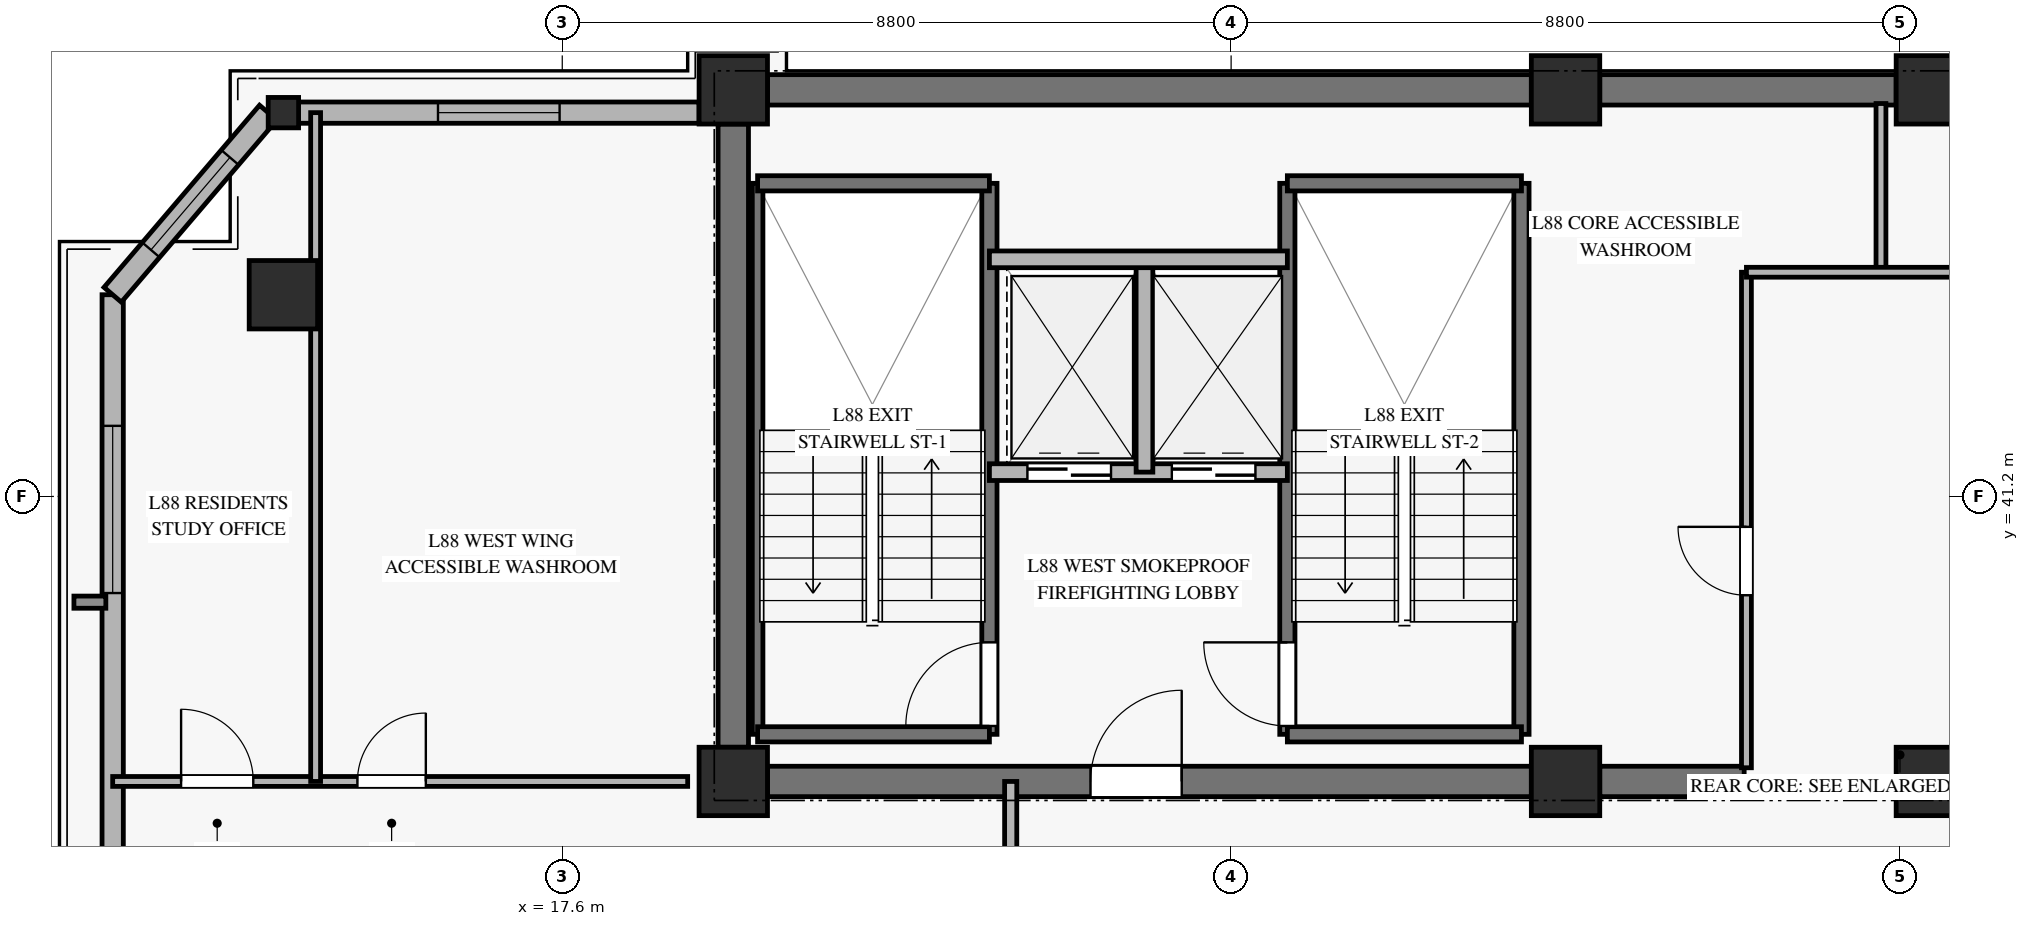
"""IFC4 building model, lengths in metres.
Left out: names, types, materials, properties, quantities, classifications, styles, units other than length and angle.
Written with IfcOpenShell. Run it as: python <this file> out.ifc"""

import sys

from ifc_helpers import new_model, si_unit, direction, frame, frame_2d, origin, origin_2d, place, context, subcontext, project, spatial, rectangle, hollow_rectangle, extrude, source, transform, mapped, element, fill, save


model = new_model("IFC4")
c1 = context("Model", 3, precision=1e-05, world=origin(), true_north=direction((0.0, 1.0)))
c2 = subcontext(c1, "Body", "Model", "MODEL_VIEW")
j1 = project(units=[si_unit("LENGTHUNIT", "METRE"), si_unit("PLANEANGLEUNIT", "RADIAN")], contexts=[c1])
p1 = place(None, origin())
s1 = spatial("IfcSite", under=j1, at=p1, CompositionType="ELEMENT")
p2 = place(p1, origin())
s2 = spatial("IfcBuilding", under=s1, at=p2, CompositionType="ELEMENT")
p3 = place(p2, frame((0.0, 0.0, 339.1)))
s3 = spatial("IfcBuildingStorey", under=s2, at=p3, CompositionType="ELEMENT", Elevation=339.1)
m1 = source(origin(), c2, "Body", "SweptSolid", [
    extrude(rectangle(XDim=0.9, YDim=0.9, at=origin_2d()), origin(), (0.0, 0.0, 1.0), 3.185),
])
for number, where, z_axis, x_axis in (
    (1, (19.85, 37.45, 0.0), (0.0, 0.0, 1.0), (1.0, 0.0, 0.0)),
    (2, (19.85, 46.55, 0.0), (0.0, 0.0, 1.0), (1.0, 0.0, 0.0)),
    (3, (30.8, 37.45, 0.0), (0.0, 0.0, 1.0), (1.0, 0.0, 0.0)),
    (4, (30.8, 46.55, 0.0), (0.0, 0.0, 1.0), (1.0, 0.0, 0.0)),
    (5, (35.6, 37.45, 0.0), (0.0, 0.0, 1.0), (1.0, 0.0, 0.0)),
    (6, (35.6, 46.55, 0.0), (0.0, 0.0, 1.0), (1.0, 0.0, 0.0)),
):
    element("IfcColumn", number, at=place(p3, frame(where, z_axis=z_axis, x_axis=x_axis)), inside=s3, PredefinedType="PILASTER", context=c2, shape_type="MappedRepresentation", body=[
        mapped(m1, transform((0.0, 0.0, 0.0), x_axis=(1.0, 0.0, 0.0), y_axis=(0.0, 1.0, 0.0), z_axis=(0.0, 0.0, 1.0), scale=1.0)),
    ])
p4 = place(p3, frame((20.3, 46.55, 0.0), z_axis=(0.0, 0.0, 1.0), x_axis=(1.0, 0.0, 0.0)))
e7 = element("IfcWall", 7, at=p4, inside=s3, PredefinedType="SHEAR", context=c2, shape_type="SweptSolid", body=[
    extrude(rectangle(XDim=10.05, YDim=0.4, at=frame_2d((5.025, 0.0))), origin(), (0.0, 0.0, 1.0), 3.185),
])
p5 = place(p3, frame((31.25, 46.55, 0.0), z_axis=(0.0, 0.0, 1.0), x_axis=(1.0, 0.0, 0.0)))
e8 = element("IfcWall", 8, at=p5, inside=s3, PredefinedType="SHEAR", context=c2, shape_type="SweptSolid", body=[
    extrude(rectangle(XDim=3.9, YDim=0.4, at=frame_2d((1.95, 0.0))), origin(), (0.0, 0.0, 1.0), 3.185),
])
p6 = place(p3, frame((20.3, 37.45, 0.0), z_axis=(0.0, 0.0, 1.0), x_axis=(1.0, 0.0, 0.0)))
e9 = element("IfcWall", 9, at=p6, inside=s3, PredefinedType="SHEAR", context=c2, shape_type="SweptSolid", body=[
    extrude(rectangle(XDim=10.05, YDim=0.4, at=frame_2d((5.025, 0.0))), origin(), (0.0, 0.0, 1.0), 3.185),
])
p7 = place(p6, frame((4.25, 0.0, 0.0)))
e10 = element("IfcOpeningElement", 10, at=p7, cuts=e9, PredefinedType="OPENING", context=c2, shape_type="SweptSolid", body=[
    extrude(rectangle(XDim=1.2, YDim=2.15, at=frame_2d((0.6, 1.075))), frame((0.0, 0.21, 0.0), z_axis=(0.0, -1.0, 0.0), x_axis=(1.0, 0.0, 0.0)), (0.0, 0.0, 1.0), 0.42),
])
p8 = place(p3, frame((31.25, 37.45, 0.0), z_axis=(0.0, 0.0, 1.0), x_axis=(1.0, 0.0, 0.0)))
e11 = element("IfcWall", 11, at=p8, inside=s3, PredefinedType="SHEAR", context=c2, shape_type="SweptSolid", body=[
    extrude(rectangle(XDim=1.9, YDim=0.4, at=frame_2d((0.95, 0.0))), origin(), (0.0, 0.0, 1.0), 3.185),
])
p9 = place(p3, frame((19.85, 37.9, 0.0), z_axis=(0.0, 0.0, 1.0), x_axis=(0.0, 1.0, 0.0)))
e12 = element("IfcWall", 12, at=p9, inside=s3, PredefinedType="SHEAR", context=c2, shape_type="SweptSolid", body=[
    extrude(rectangle(XDim=8.2, YDim=0.4, at=frame_2d((4.1, 0.0))), origin(), (0.0, 0.0, 1.0), 3.185),
])
m2 = source(origin(), c2, "Body", "SweptSolid", [
    extrude(hollow_rectangle(XDim=0.9, YDim=0.9, WallThickness=0.04, at=origin_2d()), origin(), (0.0, 0.0, 1.0), 3.185),
])
p10 = place(p3, frame((13.931, 43.854, 0.0), z_axis=(0.0, 0.0, 1.0), x_axis=(1.0, 0.0, 0.0)))
e13 = element("IfcColumn", 13, at=p10, inside=s3, PredefinedType="COLUMN", context=c2, shape_type="MappedRepresentation", body=[
    mapped(m2, transform((0.0, 0.0, 0.0), x_axis=(1.0, 0.0, 0.0), y_axis=(0.0, 1.0, 0.0), z_axis=(0.0, 0.0, 1.0), scale=1.0)),
])
m3 = source(origin(), c2, "Body", "SweptSolid", [
    extrude(hollow_rectangle(XDim=0.4, YDim=0.4, WallThickness=0.02, at=origin_2d()), origin(), (0.0, 0.0, 1.0), 3.185),
])
p11 = place(p3, frame((13.931, 46.25, 0.0), z_axis=(0.0, 0.0, 1.0), x_axis=(1.0, 0.0, 0.0)))
e14 = element("IfcColumn", 14, at=p11, inside=s3, PredefinedType="COLUMN", context=c2, shape_type="MappedRepresentation", body=[
    mapped(m3, transform((0.0, 0.0, 0.0), x_axis=(1.0, 0.0, 0.0), y_axis=(0.0, 1.0, 0.0), z_axis=(0.0, 0.0, 1.0), scale=1.0)),
])
p12 = place(p3, frame((11.685, 34.534, 0.0), z_axis=(0.0, 0.0, 1.0), x_axis=(0.0, 1.0, 0.0)))
e15 = element("IfcWall", 15, at=p12, inside=s3, PredefinedType="SOLIDWALL", context=c2, shape_type="SweptSolid", body=[
    extrude(rectangle(XDim=9.32, YDim=0.28, at=frame_2d((4.66, 0.0))), origin(), (0.0, 0.0, 1.0), 2.815),
])
p13 = place(p12, frame((5.395, 0.0, 0.45)))
e16 = element("IfcOpeningElement", 16, at=p13, cuts=e15, PredefinedType="OPENING", context=c2, shape_type="SweptSolid", body=[
    extrude(rectangle(XDim=2.2, YDim=2.1, at=frame_2d((1.1, 1.05))), frame((0.0, 0.15, 0.0), z_axis=(0.0, -1.0, 0.0), x_axis=(1.0, 0.0, 0.0)), (0.0, 0.0, 1.0), 0.3),
])
p14 = place(p3, frame((14.131, 46.25, 0.0), z_axis=(0.0, 0.0, 1.0), x_axis=(1.0, 0.0, 0.0)))
e17 = element("IfcWall", 17, at=p14, inside=s3, PredefinedType="SOLIDWALL", context=c2, shape_type="SweptSolid", body=[
    extrude(rectangle(XDim=5.269, YDim=0.28, at=frame_2d((2.634, 0.0))), origin(), (0.0, 0.0, 1.0), 2.815),
])
p15 = place(p14, frame((1.834, 0.0, 0.45)))
e18 = element("IfcOpeningElement", 18, at=p15, cuts=e17, PredefinedType="OPENING", context=c2, shape_type="SweptSolid", body=[
    extrude(rectangle(XDim=1.6, YDim=2.0, at=frame_2d((0.8, 1.0))), frame((0.0, 0.15, 0.0), z_axis=(0.0, -1.0, 0.0), x_axis=(1.0, 0.0, 0.0)), (0.0, 0.0, 1.0), 0.3),
])
p16 = place(p3, frame((13.731, 46.25, 0.0), z_axis=(0.0, 0.0, 1.0), x_axis=(-0.64936076944, -0.760480500153, 0.0)))
e19 = element("IfcWall", 19, at=p16, inside=s3, PredefinedType="SOLIDWALL", context=c2, shape_type="SweptSolid", body=[
    extrude(rectangle(XDim=3.151, YDim=0.3, at=frame_2d((1.575, 0.0))), origin(), (0.0, 0.0, 1.0), 2.815),
])
p17 = place(p16, frame((0.775, 0.0, 0.45)))
e20 = element("IfcOpeningElement", 20, at=p17, cuts=e19, PredefinedType="OPENING", context=c2, shape_type="SweptSolid", body=[
    extrude(rectangle(XDim=1.6, YDim=2.0, at=frame_2d((0.8, 1.0))), frame((0.0, 0.16, 0.0), z_axis=(0.0, -1.0, 0.0), x_axis=(1.0, 0.0, 0.0)), (0.0, 0.0, 1.0), 0.32),
])
p18 = place(p3, frame((20.17, 38.07, 0.0), z_axis=(0.0, 0.0, 1.0), x_axis=(0.0, 1.0, 0.0)))
e21 = element("IfcWall", 21, at=p18, inside=s3, PredefinedType="SOLIDWALL", context=c2, shape_type="SweptSolid", body=[
    extrude(rectangle(XDim=7.25, YDim=0.14, at=frame_2d((3.625, 0.0))), origin(), (0.0, 0.0, 1.0), 3.4),
])
p19 = place(p3, frame((23.22, 38.07, 0.0), z_axis=(0.0, 0.0, 1.0), x_axis=(0.0, 1.0, 0.0)))
e22 = element("IfcWall", 22, at=p19, inside=s3, PredefinedType="SOLIDWALL", context=c2, shape_type="SweptSolid", body=[
    extrude(rectangle(XDim=7.25, YDim=0.2, at=frame_2d((3.625, 0.0))), origin(), (0.0, 0.0, 1.0), 3.4),
])
p20 = place(p19, frame((0.11, 0.0, 0.0)))
e23 = element("IfcOpeningElement", 23, at=p20, cuts=e22, PredefinedType="OPENING", context=c2, shape_type="SweptSolid", body=[
    extrude(rectangle(XDim=1.1, YDim=2.15, at=frame_2d((0.55, 1.075))), frame((0.0, 0.11, 0.0), z_axis=(0.0, -1.0, 0.0), x_axis=(1.0, 0.0, 0.0)), (0.0, 0.0, 1.0), 0.22),
])
for number, where, z_axis, x_axis in (
    (24, (20.17, 45.32, 0.0), (0.0, 0.0, 1.0), (1.0, 0.0, 0.0)),
    (25, (20.17, 38.07, 0.0), (0.0, 0.0, 1.0), (1.0, 0.0, 0.0)),
):
    element("IfcWall", number, at=place(p3, frame(where, z_axis=z_axis, x_axis=x_axis)), inside=s3, PredefinedType="SOLIDWALL", context=c2, shape_type="SweptSolid", body=[
        extrude(rectangle(XDim=3.05, YDim=0.2, at=frame_2d((1.525, 0.0))), origin(), (0.0, 0.0, 1.0), 3.4),
    ])
p21 = place(p3, frame((27.14, 38.07, 0.0), z_axis=(0.0, 0.0, 1.0), x_axis=(0.0, 1.0, 0.0)))
e26 = element("IfcWall", 26, at=p21, inside=s3, PredefinedType="SOLIDWALL", context=c2, shape_type="SweptSolid", body=[
    extrude(rectangle(XDim=7.25, YDim=0.2, at=frame_2d((3.625, 0.0))), origin(), (0.0, 0.0, 1.0), 3.4),
])
p22 = place(p21, frame((0.11, 0.0, 0.0)))
e27 = element("IfcOpeningElement", 27, at=p22, cuts=e26, PredefinedType="OPENING", context=c2, shape_type="SweptSolid", body=[
    extrude(rectangle(XDim=1.1, YDim=2.15, at=frame_2d((0.55, 1.075))), frame((0.0, 0.11, 0.0), z_axis=(0.0, -1.0, 0.0), x_axis=(1.0, 0.0, 0.0)), (0.0, 0.0, 1.0), 0.22),
])
p23 = place(p3, frame((30.22, 38.07, 0.0), z_axis=(0.0, 0.0, 1.0), x_axis=(0.0, 1.0, 0.0)))
e28 = element("IfcWall", 28, at=p23, inside=s3, PredefinedType="SOLIDWALL", context=c2, shape_type="SweptSolid", body=[
    extrude(rectangle(XDim=7.25, YDim=0.2, at=frame_2d((3.625, 0.0))), origin(), (0.0, 0.0, 1.0), 3.4),
])
for number, where, z_axis, x_axis in (
    (29, (27.14, 45.32, 0.0), (0.0, 0.0, 1.0), (1.0, 0.0, 0.0)),
    (30, (27.14, 38.07, 0.0), (0.0, 0.0, 1.0), (1.0, 0.0, 0.0)),
):
    element("IfcWall", number, at=place(p3, frame(where, z_axis=z_axis, x_axis=x_axis)), inside=s3, PredefinedType="SOLIDWALL", context=c2, shape_type="SweptSolid", body=[
        extrude(rectangle(XDim=3.08, YDim=0.2, at=frame_2d((1.54, 0.0))), origin(), (0.0, 0.0, 1.0), 3.4),
    ])
p24 = place(p3, frame((23.22, 41.52, 0.0), z_axis=(0.0, 0.0, 1.0), x_axis=(1.0, 0.0, 0.0)))
e31 = element("IfcWall", 31, at=p24, inside=s3, PredefinedType="SOLIDWALL", context=c2, shape_type="SweptSolid", body=[
    extrude(rectangle(XDim=3.92, YDim=0.22, at=frame_2d((1.96, 0.0))), origin(), (0.0, 0.0, 1.0), 3.185),
])
p25 = place(p24, frame((0.5, 0.0, 0.0)))
e32 = element("IfcOpeningElement", 32, at=p25, cuts=e31, PredefinedType="OPENING", context=c2, shape_type="SweptSolid", body=[
    extrude(rectangle(XDim=1.1, YDim=2.2, at=frame_2d((0.55, 1.1))), frame((0.0, 0.12, 0.0), z_axis=(0.0, -1.0, 0.0), x_axis=(1.0, 0.0, 0.0)), (0.0, 0.0, 1.0), 0.24),
])
p26 = place(p24, frame((2.4, 0.0, 0.0)))
e33 = element("IfcOpeningElement", 33, at=p26, cuts=e31, PredefinedType="OPENING", context=c2, shape_type="SweptSolid", body=[
    extrude(rectangle(XDim=1.1, YDim=2.2, at=frame_2d((0.55, 1.1))), frame((0.0, 0.12, 0.0), z_axis=(0.0, -1.0, 0.0), x_axis=(1.0, 0.0, 0.0)), (0.0, 0.0, 1.0), 0.24),
])
p27 = place(p3, frame((25.26, 41.52, 0.0), z_axis=(0.0, 0.0, 1.0), x_axis=(0.0, 1.0, 0.0)))
e34 = element("IfcWall", 34, at=p27, inside=s3, PredefinedType="SOLIDWALL", context=c2, shape_type="SweptSolid", body=[
    extrude(rectangle(XDim=2.8, YDim=0.22, at=frame_2d((1.4, 0.0))), origin(), (0.0, 0.0, 1.0), 3.185),
])
p28 = place(p3, frame((23.22, 44.32, 0.0), z_axis=(0.0, 0.0, 1.0), x_axis=(1.0, 0.0, 0.0)))
e35 = element("IfcWall", 35, at=p28, inside=s3, PredefinedType="SOLIDWALL", context=c2, shape_type="SweptSolid", body=[
    extrude(rectangle(XDim=3.92, YDim=0.22, at=frame_2d((1.96, 0.0))), origin(), (0.0, 0.0, 1.0), 3.185),
])
p29 = place(p3, frame((33.18, 37.63, 0.0), z_axis=(0.0, 0.0, 1.0), x_axis=(0.0, 1.0, 0.0)))
e36 = element("IfcWall", 36, at=p29, inside=s3, PredefinedType="PARTITIONING", context=c2, shape_type="SweptSolid", body=[
    extrude(rectangle(XDim=6.52, YDim=0.13, at=frame_2d((3.26, 0.0))), origin(), (0.0, 0.0, 1.0), 2.27),
])
p30 = place(p29, frame((2.27, 0.0, 0.0)))
e37 = element("IfcOpeningElement", 37, at=p30, cuts=e36, PredefinedType="OPENING", context=c2, shape_type="SweptSolid", body=[
    extrude(rectangle(XDim=0.9, YDim=2.1, at=frame_2d((0.45, 1.05))), frame((0.0, 0.075, 0.0), z_axis=(0.0, -1.0, 0.0), x_axis=(1.0, 0.0, 0.0)), (0.0, 0.0, 1.0), 0.15),
])
p31 = place(p3, frame((34.95, 44.15, 0.0), z_axis=(0.0, 0.0, 1.0), x_axis=(0.0, 1.0, 0.0)))
e38 = element("IfcWall", 38, at=p31, inside=s3, PredefinedType="PARTITIONING", context=c2, shape_type="SweptSolid", body=[
    extrude(rectangle(XDim=2.22, YDim=0.13, at=frame_2d((1.11, 0.0))), origin(), (0.0, 0.0, 1.0), 3.185),
])
p32 = place(p3, frame((33.18, 44.15, 0.0), z_axis=(0.0, 0.0, 1.0), x_axis=(1.0, 0.0, 0.0)))
e39 = element("IfcWall", 39, at=p32, inside=s3, PredefinedType="PARTITIONING", context=c2, shape_type="SweptSolid", body=[
    extrude(rectangle(XDim=2.94, YDim=0.13, at=frame_2d((1.47, 0.0))), origin(), (0.0, 0.0, 1.0), 2.47),
])
p33 = place(p3, frame((23.5, 22.568, 0.0), z_axis=(0.0, 0.0, 1.0), x_axis=(0.0, 1.0, 0.0)))
e40 = element("IfcWall", 40, at=p33, inside=s3, PredefinedType="PARTITIONING", context=c2, shape_type="SweptSolid", body=[
    extrude(rectangle(XDim=14.882, YDim=0.16, at=frame_2d((7.441, 0.0))), origin(), (0.0, 0.0, 1.0), 2.77),
])
p34 = place(p33, frame((12.352, 0.0, 0.0)))
e41 = element("IfcOpeningElement", 41, at=p34, cuts=e40, PredefinedType="OPENING", context=c2, shape_type="SweptSolid", body=[
    extrude(rectangle(XDim=1.05, YDim=2.15, at=frame_2d((0.525, 1.075))), frame((0.0, 0.09, 0.0), z_axis=(0.0, -1.0, 0.0), x_axis=(1.0, 0.0, 0.0)), (0.0, 0.0, 1.0), 0.18),
])
p35 = place(p3, frame((11.685, 37.45, 0.0), z_axis=(0.0, 0.0, 1.0), x_axis=(1.0, 0.0, 0.0)))
e42 = element("IfcWall", 42, at=p35, inside=s3, PredefinedType="PARTITIONING", context=c2, shape_type="SweptSolid", body=[
    extrude(rectangle(XDim=7.565, YDim=0.13, at=frame_2d((3.782, 0.0))), origin(), (0.0, 0.0, 1.0), 2.82),
])
p36 = place(p35, frame((0.9, 0.0, 0.0)))
e43 = element("IfcOpeningElement", 43, at=p36, cuts=e42, PredefinedType="OPENING", context=c2, shape_type="SweptSolid", body=[
    extrude(rectangle(XDim=0.95, YDim=2.1, at=frame_2d((0.475, 1.05))), frame((0.0, 0.075, 0.0), z_axis=(0.0, -1.0, 0.0), x_axis=(1.0, 0.0, 0.0)), (0.0, 0.0, 1.0), 0.15),
])
p37 = place(p35, frame((3.22, 0.0, 0.0)))
e44 = element("IfcOpeningElement", 44, at=p37, cuts=e42, PredefinedType="OPENING", context=c2, shape_type="SweptSolid", body=[
    extrude(rectangle(XDim=0.9, YDim=2.1, at=frame_2d((0.45, 1.05))), frame((0.0, 0.075, 0.0), z_axis=(0.0, -1.0, 0.0), x_axis=(1.0, 0.0, 0.0)), (0.0, 0.0, 1.0), 0.15),
])
p38 = place(p3, frame((14.355, 37.45, 0.0), z_axis=(0.0, 0.0, 1.0), x_axis=(0.0, 1.0, 0.0)))
e45 = element("IfcWall", 45, at=p38, inside=s3, PredefinedType="PARTITIONING", context=c2, shape_type="SweptSolid", body=[
    extrude(rectangle(XDim=8.8, YDim=0.13, at=frame_2d((4.4, 0.0))), origin(), (0.0, 0.0, 1.0), 3.185),
])
m4 = source(origin(), c2, "Body", "SweptSolid", [
    extrude(rectangle(XDim=2.2, YDim=2.1, at=frame_2d((1.1, 1.05))), frame((0.0, 0.03, 0.0), z_axis=(0.0, -1.0, 0.0), x_axis=(1.0, 0.0, 0.0)), (0.0, 0.0, 1.0), 0.06),
])
p39 = place(p13, origin())
e46 = element("IfcWindow", 46, at=p39, inside=s3, PartitioningType="SINGLE_PANEL", PredefinedType="WINDOW", context=c2, shape_type="MappedRepresentation", body=[
    mapped(m4, transform((0.0, 0.0, 0.0), x_axis=(1.0, 0.0, 0.0), y_axis=(0.0, 1.0, 0.0), z_axis=(0.0, 0.0, 1.0), scale=1.0)),
])
fill(e16, e46)
m5 = source(origin(), c2, "Body", "SweptSolid", [
    extrude(rectangle(XDim=1.6, YDim=2.0, at=frame_2d((0.8, 1.0))), frame((0.0, 0.03, 0.0), z_axis=(0.0, -1.0, 0.0), x_axis=(1.0, 0.0, 0.0)), (0.0, 0.0, 1.0), 0.06),
])
p40 = place(p15, origin())
e47 = element("IfcWindow", 47, at=p40, inside=s3, PartitioningType="SINGLE_PANEL", PredefinedType="WINDOW", context=c2, shape_type="MappedRepresentation", body=[
    mapped(m5, transform((0.0, 0.0, 0.0), x_axis=(1.0, 0.0, 0.0), y_axis=(0.0, 1.0, 0.0), z_axis=(0.0, 0.0, 1.0), scale=1.0)),
])
fill(e18, e47)
p41 = place(p17, origin())
e48 = element("IfcWindow", 48, at=p41, inside=s3, PartitioningType="SINGLE_PANEL", PredefinedType="WINDOW", context=c2, shape_type="MappedRepresentation", body=[
    mapped(m5, transform((0.0, 0.0, 0.0), x_axis=(1.0, 0.0, 0.0), y_axis=(0.0, 1.0, 0.0), z_axis=(0.0, 0.0, 1.0), scale=1.0)),
])
fill(e20, e48)
m6 = source(origin(), c2, "Body", "SweptSolid", [
    extrude(rectangle(XDim=1.1, YDim=2.15, at=frame_2d((0.55, 1.075))), frame((0.0, 0.025, 0.0), z_axis=(0.0, -1.0, 0.0), x_axis=(1.0, 0.0, 0.0)), (0.0, 0.0, 1.0), 0.05),
])
p42 = place(p20, origin())
e49 = element("IfcDoor", 49, at=p42, inside=s3, OperationType="SINGLE_SWING_LEFT", PredefinedType="DOOR", context=c2, shape_type="MappedRepresentation", body=[
    mapped(m6, transform((0.0, 0.0, 0.0), x_axis=(1.0, 0.0, 0.0), y_axis=(0.0, 1.0, 0.0), z_axis=(0.0, 0.0, 1.0), scale=1.0)),
])
fill(e23, e49)
p43 = place(p22, origin())
e50 = element("IfcDoor", 50, at=p43, inside=s3, OperationType="SINGLE_SWING_RIGHT", PredefinedType="DOOR", context=c2, shape_type="MappedRepresentation", body=[
    mapped(m6, transform((0.0, 0.0, 0.0), x_axis=(1.0, 0.0, 0.0), y_axis=(0.0, 1.0, 0.0), z_axis=(0.0, 0.0, 1.0), scale=1.0)),
])
fill(e27, e50)
m7 = source(origin(), c2, "Body", "SweptSolid", [
    extrude(rectangle(XDim=1.1, YDim=2.2, at=frame_2d((0.55, 1.1))), frame((0.0, 0.025, 0.0), z_axis=(0.0, -1.0, 0.0), x_axis=(1.0, 0.0, 0.0)), (0.0, 0.0, 1.0), 0.05),
])
p44 = place(p25, origin())
e51 = element("IfcDoor", 51, at=p44, inside=s3, OperationType="SLIDING_TO_LEFT", PredefinedType="DOOR", context=c2, shape_type="MappedRepresentation", body=[
    mapped(m7, transform((0.0, 0.0, 0.0), x_axis=(1.0, 0.0, 0.0), y_axis=(0.0, 1.0, 0.0), z_axis=(0.0, 0.0, 1.0), scale=1.0)),
])
fill(e32, e51)
p45 = place(p26, origin())
e52 = element("IfcDoor", 52, at=p45, inside=s3, OperationType="SLIDING_TO_LEFT", PredefinedType="DOOR", context=c2, shape_type="MappedRepresentation", body=[
    mapped(m7, transform((0.0, 0.0, 0.0), x_axis=(1.0, 0.0, 0.0), y_axis=(0.0, 1.0, 0.0), z_axis=(0.0, 0.0, 1.0), scale=1.0)),
])
fill(e33, e52)
m8 = source(origin(), c2, "Body", "SweptSolid", [
    extrude(rectangle(XDim=1.2, YDim=2.15, at=frame_2d((0.6, 1.075))), frame((0.0, 0.025, 0.0), z_axis=(0.0, -1.0, 0.0), x_axis=(1.0, 0.0, 0.0)), (0.0, 0.0, 1.0), 0.05),
])
p46 = place(p7, origin())
e53 = element("IfcDoor", 53, at=p46, inside=s3, OperationType="SINGLE_SWING_RIGHT", PredefinedType="DOOR", context=c2, shape_type="MappedRepresentation", body=[
    mapped(m8, transform((0.0, 0.0, 0.0), x_axis=(1.0, 0.0, 0.0), y_axis=(0.0, 1.0, 0.0), z_axis=(0.0, 0.0, 1.0), scale=1.0)),
])
fill(e10, e53)
m9 = source(origin(), c2, "Body", "SweptSolid", [
    extrude(rectangle(XDim=0.9, YDim=2.1, at=frame_2d((0.45, 1.05))), frame((0.0, 0.025, 0.0), z_axis=(0.0, -1.0, 0.0), x_axis=(1.0, 0.0, 0.0)), (0.0, 0.0, 1.0), 0.05),
])
p47 = place(p30, origin())
e54 = element("IfcDoor", 54, at=p47, inside=s3, OperationType="SINGLE_SWING_RIGHT", PredefinedType="DOOR", context=c2, shape_type="MappedRepresentation", body=[
    mapped(m9, transform((0.0, 0.0, 0.0), x_axis=(1.0, 0.0, 0.0), y_axis=(0.0, 1.0, 0.0), z_axis=(0.0, 0.0, 1.0), scale=1.0)),
])
fill(e37, e54)
m10 = source(origin(), c2, "Body", "SweptSolid", [
    extrude(rectangle(XDim=0.95, YDim=2.1, at=frame_2d((0.475, 1.05))), frame((0.0, 0.025, 0.0), z_axis=(0.0, -1.0, 0.0), x_axis=(1.0, 0.0, 0.0)), (0.0, 0.0, 1.0), 0.05),
])
p48 = place(p36, origin())
e55 = element("IfcDoor", 55, at=p48, inside=s3, OperationType="SINGLE_SWING_LEFT", PredefinedType="DOOR", context=c2, shape_type="MappedRepresentation", body=[
    mapped(m10, transform((0.0, 0.0, 0.0), x_axis=(1.0, 0.0, 0.0), y_axis=(0.0, 1.0, 0.0), z_axis=(0.0, 0.0, 1.0), scale=1.0)),
])
fill(e43, e55)
p49 = place(p37, origin())
e56 = element("IfcDoor", 56, at=p49, inside=s3, OperationType="SINGLE_SWING_RIGHT", PredefinedType="DOOR", context=c2, shape_type="MappedRepresentation", body=[
    mapped(m9, transform((0.0, 0.0, 0.0), x_axis=(1.0, 0.0, 0.0), y_axis=(0.0, 1.0, 0.0), z_axis=(0.0, 0.0, 1.0), scale=1.0)),
])
fill(e44, e56)
save(model, sys.argv[1])
